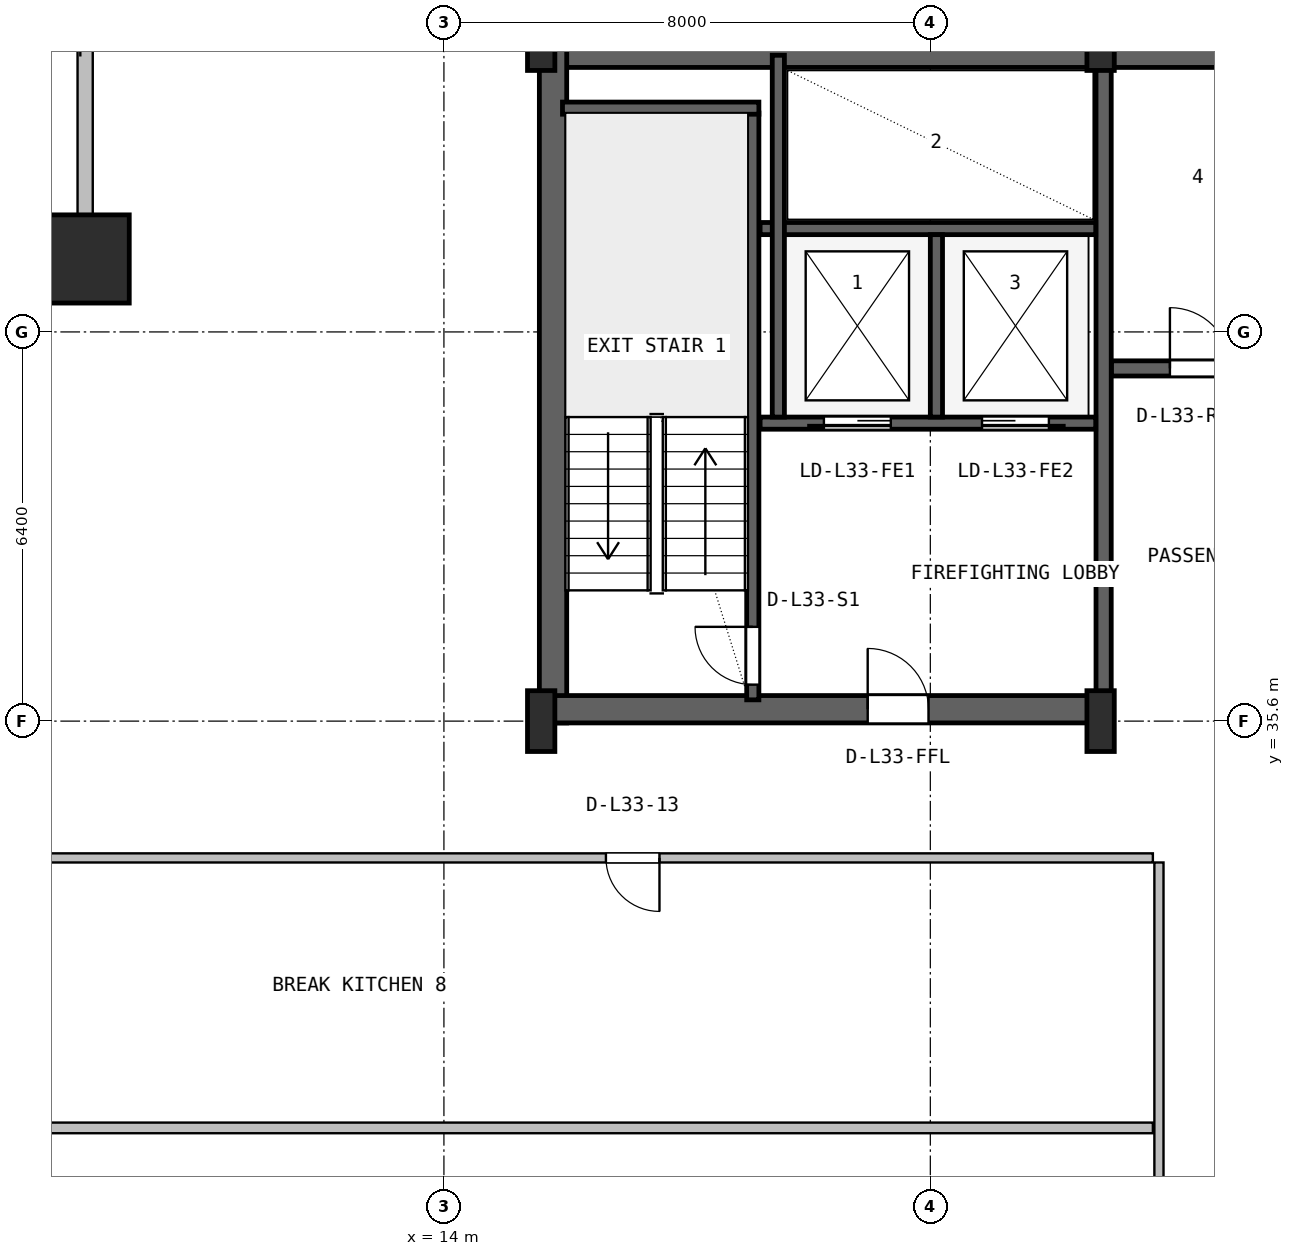
"""IFC4 building model, lengths in metres.
Left out: names, types, materials, properties, quantities, classifications, styles, units other than length and angle.
Written with IfcOpenShell. Run it as: python <this file> out.ifc"""

import sys

from ifc_helpers import new_model, si_unit, direction, frame, frame_2d, origin, origin_2d, place, context, subcontext, project, spatial, rectangle, hollow_rectangle, i_section, extrude, source, transform, mapped, element, fill, save


model = new_model("IFC4")
c1 = context("Model", 3, precision=1e-05, world=origin(), true_north=direction((0.0, 1.0)))
c2 = subcontext(c1, "Body", "Model", "MODEL_VIEW")
j1 = project(units=[si_unit("LENGTHUNIT", "METRE"), si_unit("PLANEANGLEUNIT", "RADIAN")], contexts=[c1])
p1 = place(None, origin())
s1 = spatial("IfcSite", under=j1, at=p1, CompositionType="ELEMENT")
p2 = place(p1, origin())
s2 = spatial("IfcBuilding", under=s1, at=p2, CompositionType="ELEMENT")
p3 = place(p2, frame((0.0, 0.0, 137.2)))
s3 = spatial("IfcBuildingStorey", under=s2, at=p3, CompositionType="ELEMENT", Elevation=137.2)
p4 = place(p3, frame((15.6, 46.575, 0.0), z_axis=(0.0, 0.0, 1.0), x_axis=(1.0, 0.0, 0.0)))
e1 = element("IfcWall", 1, at=p4, inside=s3, PredefinedType="SHEAR", context=c2, shape_type="SweptSolid", body=[
    extrude(rectangle(XDim=36.8, YDim=0.45, at=frame_2d((18.4, 0.0))), origin(), (0.0, 0.0, 1.0), 3.48),
])
p5 = place(p3, frame((15.795, 35.57, 0.0), z_axis=(0.0, 0.0, 1.0), x_axis=(0.0, 1.0, 0.0)))
e2 = element("IfcWall", 2, at=p5, inside=s3, PredefinedType="SHEAR", context=c2, shape_type="SweptSolid", body=[
    extrude(rectangle(XDim=11.23, YDim=0.45, at=frame_2d((5.615, 0.0))), origin(), (0.0, 0.0, 1.0), 3.48),
])
p6 = place(p3, frame((15.57, 35.795, 0.0), z_axis=(0.0, 0.0, 1.0), x_axis=(1.0, 0.0, 0.0)))
e3 = element("IfcWall", 3, at=p6, inside=s3, PredefinedType="SHEAR", context=c2, shape_type="SweptSolid", body=[
    extrude(rectangle(XDim=9.23, YDim=0.45, at=frame_2d((4.615, 0.0))), origin(), (0.0, 0.0, 1.0), 3.48),
])
p7 = place(p6, frame((5.4, 0.0, 0.0)))
e4 = element("IfcOpeningElement", 4, at=p7, cuts=e3, PredefinedType="OPENING", context=c2, shape_type="SweptSolid", body=[
    extrude(rectangle(XDim=1.0, YDim=2.1, at=frame_2d((0.5, 1.05))), frame((0.0, 0.235, 0.0), z_axis=(0.0, -1.0, 0.0), x_axis=(1.0, 0.0, 0.0)), (0.0, 0.0, 1.0), 0.47),
])
m1 = source(origin(), c2, "Body", "SweptSolid", [
    extrude(i_section(OverallWidth=0.45, OverallDepth=1.0, WebThickness=0.016, FlangeThickness=0.03, FilletRadius=0.016, at=origin_2d()), origin(), (0.0, 0.0, 1.0), 3.8),
])
for number, where, z_axis, x_axis in (
    (5, (15.6, 35.6, 0.0), (0.0, 0.0, 1.0), (1.0, 0.0, 0.0)),
    (6, (15.6, 46.8, 0.0), (0.0, 0.0, 1.0), (1.0, 0.0, 0.0)),
    (7, (24.8, 35.6, 0.0), (0.0, 0.0, 1.0), (1.0, 0.0, 0.0)),
    (8, (24.8, 46.8, 0.0), (0.0, 0.0, 1.0), (1.0, 0.0, 0.0)),
):
    element("IfcColumn", number, at=place(p3, frame(where, z_axis=z_axis, x_axis=x_axis)), inside=s3, PredefinedType="COLUMN", context=c2, shape_type="MappedRepresentation", body=[
        mapped(m1, transform((0.0, 0.0, 0.0), x_axis=(1.0, 0.0, 0.0), y_axis=(0.0, 1.0, 0.0), z_axis=(0.0, 0.0, 1.0), scale=1.0)),
    ])
m2 = source(origin(), c2, "Body", "SweptSolid", [
    extrude(hollow_rectangle(XDim=1.45, YDim=1.45, WallThickness=0.055, at=origin_2d()), origin(), (0.0, 0.0, 1.0), 3.8),
])
p8 = place(p3, frame((8.1, 43.2, 0.0), z_axis=(0.0, 0.0, 1.0), x_axis=(1.0, 0.0, 0.0)))
e9 = element("IfcColumn", 9, at=p8, inside=s3, PredefinedType="COLUMN", context=c2, shape_type="MappedRepresentation", body=[
    mapped(m2, transform((0.0, 0.0, 0.0), x_axis=(1.0, 0.0, 0.0), y_axis=(0.0, 1.0, 0.0), z_axis=(0.0, 0.0, 1.0), scale=1.0)),
])
p9 = place(p3, frame((4.58, 43.2, 0.0), z_axis=(0.0, 0.0, 1.0), x_axis=(1.0, 0.0, 0.0)))
e10 = element("IfcWall", 10, at=p9, inside=s3, PredefinedType="SOLIDWALL", context=c2, shape_type="SweptSolid", body=[
    extrude(rectangle(XDim=3.39, YDim=0.25, at=frame_2d((1.695, 0.0))), origin(), (0.0, 0.0, 1.0), 3.46),
])
p10 = place(p3, frame((8.1, 43.12, 0.0), z_axis=(0.0, 0.0, 1.0), x_axis=(0.0, 1.0, 0.0)))
e11 = element("IfcWall", 11, at=p10, inside=s3, PredefinedType="SOLIDWALL", context=c2, shape_type="SweptSolid", body=[
    extrude(rectangle(XDim=3.6, YDim=0.25, at=frame_2d((1.8, 0.0))), origin(), (0.0, 0.0, 1.0), 3.038),
])
p11 = place(p3, frame((19.08, 35.95, 0.0), z_axis=(0.0, 0.0, 1.0), x_axis=(0.0, 1.0, 0.0)))
e12 = element("IfcWall", 12, at=p11, inside=s3, PredefinedType="SHEAR", context=c2, shape_type="SweptSolid", body=[
    extrude(rectangle(XDim=9.65, YDim=0.2, at=frame_2d((4.825, 0.0))), origin(), (0.0, 0.0, 1.0), 3.48),
])
p12 = place(p11, frame((0.25, 0.0, 0.0)))
e13 = element("IfcOpeningElement", 13, at=p12, cuts=e12, PredefinedType="OPENING", context=c2, shape_type="SweptSolid", body=[
    extrude(rectangle(XDim=0.95, YDim=2.1, at=frame_2d((0.475, 1.05))), frame((0.0, 0.11, 0.0), z_axis=(0.0, -1.0, 0.0), x_axis=(1.0, 0.0, 0.0)), (0.0, 0.0, 1.0), 0.22),
])
p13 = place(p3, frame((15.95, 45.68, 0.0), z_axis=(0.0, 0.0, 1.0), x_axis=(1.0, 0.0, 0.0)))
e14 = element("IfcWall", 14, at=p13, inside=s3, PredefinedType="SHEAR", context=c2, shape_type="SweptSolid", body=[
    extrude(rectangle(XDim=3.23, YDim=0.2, at=frame_2d((1.615, 0.0))), origin(), (0.0, 0.0, 1.0), 3.48),
])
p14 = place(p3, frame((24.85, 36.05, 0.0), z_axis=(0.0, 0.0, 1.0), x_axis=(0.0, 1.0, 0.0)))
e15 = element("IfcWall", 15, at=p14, inside=s3, PredefinedType="SHEAR", context=c2, shape_type="SweptSolid", body=[
    extrude(rectangle(XDim=10.45, YDim=0.25, at=frame_2d((5.225, 0.0))), origin(), (0.0, 0.0, 1.0), 3.48),
])
p15 = place(p3, frame((19.2, 40.5, 0.0), z_axis=(0.0, 0.0, 1.0), x_axis=(1.0, 0.0, 0.0)))
e16 = element("IfcWall", 16, at=p15, inside=s3, PredefinedType="SHEAR", context=c2, shape_type="SweptSolid", body=[
    extrude(rectangle(XDim=5.52, YDim=0.2, at=frame_2d((2.76, 0.0))), origin(), (0.0, 0.0, 1.0), 3.48),
])
p16 = place(p15, frame((1.05, 0.0, 0.0)))
e17 = element("IfcOpeningElement", 17, at=p16, cuts=e16, PredefinedType="OPENING", context=c2, shape_type="SweptSolid", body=[
    extrude(rectangle(XDim=1.1, YDim=2.18, at=frame_2d((0.55, 1.09))), frame((0.0, 0.11, 0.0), z_axis=(0.0, -1.0, 0.0), x_axis=(1.0, 0.0, 0.0)), (0.0, 0.0, 1.0), 0.22),
])
p17 = place(p15, frame((3.65, 0.0, 0.0)))
e18 = element("IfcOpeningElement", 18, at=p17, cuts=e16, PredefinedType="OPENING", context=c2, shape_type="SweptSolid", body=[
    extrude(rectangle(XDim=1.1, YDim=2.18, at=frame_2d((0.55, 1.09))), frame((0.0, 0.11, 0.0), z_axis=(0.0, -1.0, 0.0), x_axis=(1.0, 0.0, 0.0)), (0.0, 0.0, 1.0), 0.22),
])
p18 = place(p3, frame((19.2, 43.7, 0.0), z_axis=(0.0, 0.0, 1.0), x_axis=(1.0, 0.0, 0.0)))
e19 = element("IfcWall", 19, at=p18, inside=s3, PredefinedType="SHEAR", context=c2, shape_type="SweptSolid", body=[
    extrude(rectangle(XDim=5.52, YDim=0.2, at=frame_2d((2.76, 0.0))), origin(), (0.0, 0.0, 1.0), 3.48),
])
p19 = place(p3, frame((22.1, 40.6, 0.0), z_axis=(0.0, 0.0, 1.0), x_axis=(0.0, 1.0, 0.0)))
e20 = element("IfcWall", 20, at=p19, inside=s3, PredefinedType="SHEAR", context=c2, shape_type="SweptSolid", body=[
    extrude(rectangle(XDim=3.0, YDim=0.2, at=frame_2d((1.5, 0.0))), origin(), (0.0, 0.0, 1.0), 3.48),
])
p20 = place(p3, frame((19.5, 40.6, 0.0), z_axis=(0.0, 0.0, 1.0), x_axis=(0.0, 1.0, 0.0)))
e21 = element("IfcWall", 21, at=p20, inside=s3, PredefinedType="SHEAR", context=c2, shape_type="SweptSolid", body=[
    extrude(rectangle(XDim=5.95, YDim=0.2, at=frame_2d((2.975, 0.0))), origin(), (0.0, 0.0, 1.0), 3.48),
])
p21 = place(p3, frame((24.98, 41.4, 0.0), z_axis=(0.0, 0.0, 1.0), x_axis=(1.0, 0.0, 0.0)))
e22 = element("IfcWall", 22, at=p21, inside=s3, PredefinedType="SHEAR", context=c2, shape_type="SweptSolid", body=[
    extrude(rectangle(XDim=23.82, YDim=0.25, at=frame_2d((11.91, 0.0))), origin(), (0.0, 0.0, 1.0), 3.48),
])
p22 = place(p21, frame((8.87, 0.0, 0.0)))
e23 = element("IfcOpeningElement", 23, at=p22, cuts=e22, PredefinedType="OPENING", context=c2, shape_type="SweptSolid", body=[
    extrude(rectangle(XDim=1.1, YDim=2.18, at=frame_2d((0.55, 1.09))), frame((0.0, 0.135, 0.0), z_axis=(0.0, -1.0, 0.0), x_axis=(1.0, 0.0, 0.0)), (0.0, 0.0, 1.0), 0.27),
])
p23 = place(p21, frame((11.47, 0.0, 0.0)))
e24 = element("IfcOpeningElement", 24, at=p23, cuts=e22, PredefinedType="OPENING", context=c2, shape_type="SweptSolid", body=[
    extrude(rectangle(XDim=1.1, YDim=2.18, at=frame_2d((0.55, 1.09))), frame((0.0, 0.135, 0.0), z_axis=(0.0, -1.0, 0.0), x_axis=(1.0, 0.0, 0.0)), (0.0, 0.0, 1.0), 0.27),
])
p24 = place(p21, frame((14.07, 0.0, 0.0)))
e25 = element("IfcOpeningElement", 25, at=p24, cuts=e22, PredefinedType="OPENING", context=c2, shape_type="SweptSolid", body=[
    extrude(rectangle(XDim=1.1, YDim=2.18, at=frame_2d((0.55, 1.09))), frame((0.0, 0.135, 0.0), z_axis=(0.0, -1.0, 0.0), x_axis=(1.0, 0.0, 0.0)), (0.0, 0.0, 1.0), 0.27),
])
p25 = place(p21, frame((0.96, 0.0, 0.0)))
e26 = element("IfcOpeningElement", 26, at=p25, cuts=e22, PredefinedType="OPENING", context=c2, shape_type="SweptSolid", body=[
    extrude(rectangle(XDim=1.0, YDim=2.08, at=frame_2d((0.5, 1.04))), frame((0.0, 0.135, 0.0), z_axis=(0.0, -1.0, 0.0), x_axis=(1.0, 0.0, 0.0)), (0.0, 0.0, 1.0), 0.27),
])
p26 = place(p21, frame((3.56, 0.0, 0.0)))
e27 = element("IfcOpeningElement", 27, at=p26, cuts=e22, PredefinedType="OPENING", context=c2, shape_type="SweptSolid", body=[
    extrude(rectangle(XDim=1.0, YDim=2.08, at=frame_2d((0.5, 1.04))), frame((0.0, 0.135, 0.0), z_axis=(0.0, -1.0, 0.0), x_axis=(1.0, 0.0, 0.0)), (0.0, 0.0, 1.0), 0.27),
])
p27 = place(p21, frame((6.16, 0.0, 0.0)))
e28 = element("IfcOpeningElement", 28, at=p27, cuts=e22, PredefinedType="OPENING", context=c2, shape_type="SweptSolid", body=[
    extrude(rectangle(XDim=0.92, YDim=2.08, at=frame_2d((0.46, 1.04))), frame((0.0, 0.135, 0.0), z_axis=(0.0, -1.0, 0.0), x_axis=(1.0, 0.0, 0.0)), (0.0, 0.0, 1.0), 0.27),
])
p28 = place(p3, frame((25.76, 15.178, 0.0), z_axis=(0.0, 0.0, 1.0), x_axis=(0.0, 1.0, 0.0)))
e29 = element("IfcWall", 29, at=p28, inside=s3, PredefinedType="PARTITIONING", context=c2, shape_type="SweptSolid", body=[
    extrude(rectangle(XDim=18.097, YDim=0.15, at=frame_2d((9.048, 0.0))), origin(), (0.0, 0.0, 1.0), 2.76),
])
p29 = place(p28, frame((2.512, 0.0, 0.0)))
e30 = element("IfcOpeningElement", 30, at=p29, cuts=e29, PredefinedType="OPENING", context=c2, shape_type="SweptSolid", body=[
    extrude(rectangle(XDim=0.92, YDim=2.08, at=frame_2d((0.46, 1.04))), frame((0.0, 0.085, 0.0), z_axis=(0.0, -1.0, 0.0), x_axis=(1.0, 0.0, 0.0)), (0.0, 0.0, 1.0), 0.17),
])
p30 = place(p28, frame((9.407, 0.0, 0.0)))
e31 = element("IfcOpeningElement", 31, at=p30, cuts=e29, PredefinedType="OPENING", context=c2, shape_type="SweptSolid", body=[
    extrude(rectangle(XDim=1.05, YDim=2.1, at=frame_2d((0.525, 1.05))), frame((0.0, 0.085, 0.0), z_axis=(0.0, -1.0, 0.0), x_axis=(1.0, 0.0, 0.0)), (0.0, 0.0, 1.0), 0.17),
])
p31 = place(p3, frame((4.68, 28.91, 0.0), z_axis=(0.0, 0.0, 1.0), x_axis=(1.0, 0.0, 0.0)))
e32 = element("IfcWall", 32, at=p31, inside=s3, PredefinedType="PARTITIONING", context=c2, shape_type="SweptSolid", body=[
    extrude(rectangle(XDim=20.98, YDim=0.175, at=frame_2d((10.49, 0.0))), origin(), (0.0, 0.0, 1.0), 2.76),
])
p32 = place(p3, frame((4.68, 33.35, 0.0), z_axis=(0.0, 0.0, 1.0), x_axis=(1.0, 0.0, 0.0)))
e33 = element("IfcWall", 33, at=p32, inside=s3, PredefinedType="PARTITIONING", context=c2, shape_type="SweptSolid", body=[
    extrude(rectangle(XDim=20.98, YDim=0.15, at=frame_2d((10.49, 0.0))), origin(), (0.0, 0.0, 1.0), 2.76),
])
p33 = place(p32, frame((11.985, 0.0, 0.0)))
e34 = element("IfcOpeningElement", 34, at=p33, cuts=e33, PredefinedType="OPENING", context=c2, shape_type="SweptSolid", body=[
    extrude(rectangle(XDim=0.88, YDim=2.06, at=frame_2d((0.44, 1.03))), frame((0.0, 0.085, 0.0), z_axis=(0.0, -1.0, 0.0), x_axis=(1.0, 0.0, 0.0)), (0.0, 0.0, 1.0), 0.17),
])
m3 = source(origin(), c2, "Body", "SweptSolid", [
    extrude(rectangle(XDim=0.95, YDim=2.1, at=frame_2d((0.475, 1.05))), frame((0.0, 0.025, 0.0), z_axis=(0.0, -1.0, 0.0), x_axis=(1.0, 0.0, 0.0)), (0.0, 0.0, 1.0), 0.05),
])
p34 = place(p12, origin())
e35 = element("IfcDoor", 35, at=p34, inside=s3, OperationType="SINGLE_SWING_RIGHT", PredefinedType="DOOR", context=c2, shape_type="MappedRepresentation", body=[
    mapped(m3, transform((0.0, 0.0, 0.0), x_axis=(1.0, 0.0, 0.0), y_axis=(0.0, 1.0, 0.0), z_axis=(0.0, 0.0, 1.0), scale=1.0)),
])
fill(e13, e35)
m4 = source(origin(), c2, "Body", "SweptSolid", [
    extrude(rectangle(XDim=1.0, YDim=2.1, at=frame_2d((0.5, 1.05))), frame((0.0, 0.025, 0.0), z_axis=(0.0, -1.0, 0.0), x_axis=(1.0, 0.0, 0.0)), (0.0, 0.0, 1.0), 0.05),
])
p35 = place(p7, origin())
e36 = element("IfcDoor", 36, at=p35, inside=s3, OperationType="SINGLE_SWING_LEFT", PredefinedType="DOOR", context=c2, shape_type="MappedRepresentation", body=[
    mapped(m4, transform((0.0, 0.0, 0.0), x_axis=(1.0, 0.0, 0.0), y_axis=(0.0, 1.0, 0.0), z_axis=(0.0, 0.0, 1.0), scale=1.0)),
])
fill(e4, e36)
m5 = source(origin(), c2, "Body", "SweptSolid", [
    extrude(rectangle(XDim=1.1, YDim=2.18, at=frame_2d((0.55, 1.09))), frame((0.0, 0.025, 0.0), z_axis=(0.0, -1.0, 0.0), x_axis=(1.0, 0.0, 0.0)), (0.0, 0.0, 1.0), 0.05),
])
p36 = place(p16, frame((1.1, 0.0, 0.0), z_axis=(0.0, 0.0, 1.0), x_axis=(-1.0, 0.0, 0.0)))
e37 = element("IfcDoor", 37, at=p36, inside=s3, OperationType="SLIDING_TO_LEFT", PredefinedType="DOOR", context=c2, shape_type="MappedRepresentation", body=[
    mapped(m5, transform((0.0, 0.0, 0.0), x_axis=(1.0, 0.0, 0.0), y_axis=(0.0, 1.0, 0.0), z_axis=(0.0, 0.0, 1.0), scale=1.0)),
])
fill(e17, e37)
p37 = place(p17, frame((1.1, 0.0, 0.0), z_axis=(0.0, 0.0, 1.0), x_axis=(-1.0, 0.0, 0.0)))
e38 = element("IfcDoor", 38, at=p37, inside=s3, OperationType="SLIDING_TO_RIGHT", PredefinedType="DOOR", context=c2, shape_type="MappedRepresentation", body=[
    mapped(m5, transform((0.0, 0.0, 0.0), x_axis=(1.0, 0.0, 0.0), y_axis=(0.0, 1.0, 0.0), z_axis=(0.0, 0.0, 1.0), scale=1.0)),
])
fill(e18, e38)
m6 = source(origin(), c2, "Body", "SweptSolid", [
    extrude(rectangle(XDim=1.0, YDim=2.08, at=frame_2d((0.5, 1.04))), frame((0.0, 0.025, 0.0), z_axis=(0.0, -1.0, 0.0), x_axis=(1.0, 0.0, 0.0)), (0.0, 0.0, 1.0), 0.05),
])
p38 = place(p25, origin())
e39 = element("IfcDoor", 39, at=p38, inside=s3, OperationType="SINGLE_SWING_LEFT", PredefinedType="DOOR", context=c2, shape_type="MappedRepresentation", body=[
    mapped(m6, transform((0.0, 0.0, 0.0), x_axis=(1.0, 0.0, 0.0), y_axis=(0.0, 1.0, 0.0), z_axis=(0.0, 0.0, 1.0), scale=1.0)),
])
fill(e26, e39)
m7 = source(origin(), c2, "Body", "SweptSolid", [
    extrude(rectangle(XDim=0.88, YDim=2.06, at=frame_2d((0.44, 1.03))), frame((0.0, 0.025, 0.0), z_axis=(0.0, -1.0, 0.0), x_axis=(1.0, 0.0, 0.0)), (0.0, 0.0, 1.0), 0.05),
])
p39 = place(p33, frame((0.88, 0.0, 0.0), z_axis=(0.0, 0.0, 1.0), x_axis=(-1.0, 0.0, 0.0)))
e40 = element("IfcDoor", 40, at=p39, inside=s3, OperationType="SINGLE_SWING_RIGHT", PredefinedType="DOOR", context=c2, shape_type="MappedRepresentation", body=[
    mapped(m7, transform((0.0, 0.0, 0.0), x_axis=(1.0, 0.0, 0.0), y_axis=(0.0, 1.0, 0.0), z_axis=(0.0, 0.0, 1.0), scale=1.0)),
])
fill(e34, e40)
save(model, sys.argv[1])
